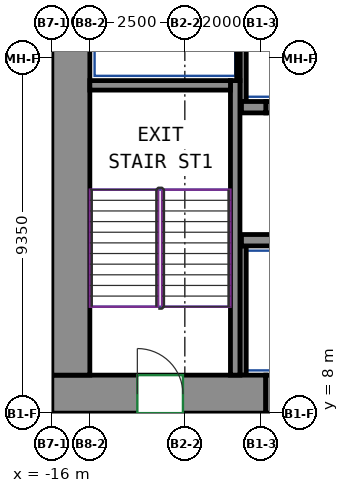
"""IFC4 building model, lengths in metres.
Left out: names, types, materials, properties, quantities, classifications, styles, units other than length and angle.
Written with IfcOpenShell. Run it as: python <this file> out.ifc"""

import sys

from ifc_helpers import new_model, si_unit, direction, frame, frame_2d, origin, place, context, subcontext, project, spatial, rectangle, extrude, source, transform, mapped, element, fill, save


model = new_model("IFC4")
c1 = context("Model", 3, precision=1e-05, world=origin(), true_north=direction((0.0, 1.0)))
c2 = subcontext(c1, "Body", "Model", "MODEL_VIEW")
j1 = project(units=[si_unit("LENGTHUNIT", "METRE"), si_unit("PLANEANGLEUNIT", "RADIAN")], contexts=[c1])
p1 = place(None, origin())
s1 = spatial("IfcSite", under=j1, at=p1, CompositionType="ELEMENT")
p2 = place(p1, origin())
s2 = spatial("IfcBuilding", under=s1, at=p2, CompositionType="ELEMENT")
p3 = place(p2, frame((0.0, 0.0, 63.2)))
s3 = spatial("IfcBuildingStorey", under=s2, at=p3, CompositionType="ELEMENT", Elevation=63.2)
m1 = source(origin(), c2, "Body", "SweptSolid", [
    extrude(rectangle(XDim=5.63, YDim=1.0, at=frame_2d((2.815, 0.0))), origin(), (0.0, 0.0, 1.0), 3.72),
])
p4 = place(p3, frame((-16.0, 8.5, 0.0), z_axis=(0.0, 0.0, 1.0), x_axis=(1.0, 0.0, 0.0)))
e1 = element("IfcWall", 1, at=p4, inside=s3, PredefinedType="SHEAR", context=c2, shape_type="MappedRepresentation", body=[
    mapped(m1, transform((0.0, 0.0, 0.0))),
])
p5 = place(p4, frame((2.25, 0.0, 0.0)))
e2 = element("IfcOpeningElement", 2, at=p5, cuts=e1, PredefinedType="OPENING", context=c2, shape_type="SweptSolid", body=[
    extrude(rectangle(XDim=1.2, YDim=2.1, at=frame_2d((0.6, 1.05))), frame((0.0, 0.51, 0.0), z_axis=(0.0, -1.0, 0.0), x_axis=(1.0, 0.0, 0.0)), (0.0, 0.0, 1.0), 1.02),
])
m2 = source(origin(), c2, "Body", "SweptSolid", [
    extrude(rectangle(XDim=12.0, YDim=1.0, at=frame_2d((6.0, 0.0))), origin(), (0.0, 0.0, 1.0), 3.72),
])
p6 = place(p3, frame((-15.5, 9.0, 0.0), z_axis=(0.0, 0.0, 1.0), x_axis=(0.0, 1.0, 0.0)))
e3 = element("IfcWall", 3, at=p6, inside=s3, PredefinedType="SHEAR", context=c2, shape_type="MappedRepresentation", body=[
    mapped(m2, transform((0.0, 0.0, 0.0))),
])
m3 = source(origin(), c2, "Body", "SweptSolid", [
    extrude(rectangle(XDim=7.75, YDim=0.25, at=frame_2d((3.875, 0.0))), origin(), (0.0, 0.0, 1.0), 3.72),
])
p7 = place(p3, frame((-11.175, 9.0, 0.0), z_axis=(0.0, 0.0, 1.0), x_axis=(0.0, 1.0, 0.0)))
e4 = element("IfcWall", 4, at=p7, inside=s3, PredefinedType="SHEAR", context=c2, shape_type="MappedRepresentation", body=[
    mapped(m3, transform((0.0, 0.0, 0.0))),
])
m4 = source(origin(), c2, "Body", "SweptSolid", [
    extrude(rectangle(XDim=3.7, YDim=0.25, at=frame_2d((1.85, 0.0))), origin(), (0.0, 0.0, 1.0), 3.72),
])
p8 = place(p3, frame((-15.0, 16.625, 0.0), z_axis=(0.0, 0.0, 1.0), x_axis=(1.0, 0.0, 0.0)))
e5 = element("IfcWall", 5, at=p8, inside=s3, PredefinedType="SHEAR", context=c2, shape_type="MappedRepresentation", body=[
    mapped(m4, transform((0.0, 0.0, 0.0))),
])
m5 = source(origin(), c2, "Body", "SweptSolid", [
    extrude(rectangle(XDim=6.0, YDim=0.3, at=frame_2d((3.0, 0.0))), origin(), (0.0, 0.0, 1.0), 3.72),
])
p9 = place(p3, frame((-11.01, 12.55, 0.0), z_axis=(0.0, 0.0, 1.0), x_axis=(1.0, 0.0, 0.0)))
e6 = element("IfcWall", 6, at=p9, inside=s3, PredefinedType="SHEAR", context=c2, shape_type="MappedRepresentation", body=[
    mapped(m5, transform((0.0, 0.0, 0.0))),
])
m6 = source(origin(), c2, "Body", "SweptSolid", [
    extrude(rectangle(XDim=0.64, YDim=0.3, at=frame_2d((0.32, 0.0))), origin(), (0.0, 0.0, 1.0), 3.72),
])
p10 = place(p3, frame((-11.01, 16.05, 0.0), z_axis=(0.0, 0.0, 1.0), x_axis=(1.0, 0.0, 0.0)))
e7 = element("IfcWall", 7, at=p10, inside=s3, PredefinedType="SHEAR", context=c2, shape_type="MappedRepresentation", body=[
    mapped(m6, transform((0.0, 0.0, 0.0))),
])
m7 = source(origin(), c2, "Body", "SweptSolid", [
    extrude(rectangle(XDim=1.4, YDim=0.3, at=frame_2d((0.7, 0.0))), origin(), (0.0, 0.0, 1.0), 3.72),
])
p11 = place(p3, frame((-10.37, 16.05, 0.0), z_axis=(0.0, 0.0, 1.0), x_axis=(1.0, 0.0, 0.0)))
e8 = element("IfcWall", 8, at=p11, inside=s3, PredefinedType="PARTITIONING", context=c2, shape_type="MappedRepresentation", body=[
    mapped(m7, transform((0.0, 0.0, 0.0))),
])
p12 = place(p11, frame((0.15, 0.0, 0.0)))
e9 = element("IfcOpeningElement", 9, at=p12, cuts=e8, PredefinedType="OPENING", context=c2, shape_type="SweptSolid", body=[
    extrude(rectangle(XDim=1.1, YDim=2.1, at=frame_2d((0.55, 1.05))), frame((0.0, 0.16, 0.0), z_axis=(0.0, -1.0, 0.0), x_axis=(1.0, 0.0, 0.0)), (0.0, 0.0, 1.0), 0.32),
])
m8 = source(origin(), c2, "Body", "SweptSolid", [
    extrude(rectangle(XDim=3.275, YDim=0.165, at=frame_2d((1.638, 0.0))), origin(), (0.0, 0.0, 1.0), 3.72),
])
p13 = place(p3, frame((-10.968, 16.2, 0.0), z_axis=(0.0, 0.0, 1.0), x_axis=(0.0, 1.0, 0.0)))
e10 = element("IfcWall", 10, at=p13, inside=s3, PredefinedType="PARTITIONING", context=c2, shape_type="MappedRepresentation", body=[
    mapped(m8, transform((0.0, 0.0, 0.0))),
])
m9 = source(origin(), c2, "Body", "SweptSolid", [
    extrude(rectangle(XDim=2.725, YDim=0.085, at=frame_2d((1.363, 0.0))), origin(), (0.0, 0.0, 1.0), 3.72),
])
p14 = place(p3, frame((-11.093, 16.75, 0.0), z_axis=(0.0, 0.0, 1.0), x_axis=(0.0, 1.0, 0.0)))
e11 = element("IfcWall", 11, at=p14, inside=s3, PredefinedType="PARTITIONING", context=c2, shape_type="MappedRepresentation", body=[
    mapped(m9, transform((0.0, 0.0, 0.0))),
])
m10 = source(origin(), c2, "Body", "SweptSolid", [
    extrude(rectangle(XDim=3.4, YDim=0.165, at=frame_2d((1.7, 0.0))), origin(), (0.0, 0.0, 1.0), 3.72),
])
p15 = place(p3, frame((-10.968, 9.0, 0.0), z_axis=(0.0, 0.0, 1.0), x_axis=(0.0, 1.0, 0.0)))
e12 = element("IfcWall", 12, at=p15, inside=s3, PredefinedType="PARTITIONING", context=c2, shape_type="MappedRepresentation", body=[
    mapped(m10, transform((0.0, 0.0, 0.0))),
])
m11 = source(origin(), c2, "Body", "SweptSolid", [
    extrude(rectangle(XDim=1.4, YDim=1.0, at=frame_2d((0.7, 0.0))), origin(), (0.0, 0.0, 1.0), 2.7),
])
p16 = place(p3, frame((-10.37, 8.5, 0.0), z_axis=(0.0, 0.0, 1.0), x_axis=(1.0, 0.0, 0.0)))
e13 = element("IfcWall", 13, at=p16, inside=s3, PredefinedType="PARTITIONING", context=c2, shape_type="MappedRepresentation", body=[
    mapped(m11, transform((0.0, 0.0, 0.0))),
])
p17 = place(p16, frame((0.25, 0.0, 0.0)))
e14 = element("IfcOpeningElement", 14, at=p17, cuts=e13, PredefinedType="OPENING", context=c2, shape_type="SweptSolid", body=[
    extrude(rectangle(XDim=0.9, YDim=2.1, at=frame_2d((0.45, 1.05))), frame((0.0, 0.51, 0.0), z_axis=(0.0, -1.0, 0.0), x_axis=(1.0, 0.0, 0.0)), (0.0, 0.0, 1.0), 1.02),
])
p18 = place(p5, origin())
e15 = element("IfcDoor", 15, at=p18, inside=s3, OperationType="DOUBLE_DOOR_SINGLE_SWING", PredefinedType="DOOR", context=c2, shape_type="SweptSolid", body=[
    extrude(rectangle(XDim=1.2, YDim=2.1, at=frame_2d((0.6, 1.05))), frame((0.0, 0.405, 0.0), z_axis=(0.0, -1.0, 0.0), x_axis=(1.0, 0.0, 0.0)), (0.0, 0.0, 1.0), 0.05),
])
fill(e2, e15)
save(model, sys.argv[1])
